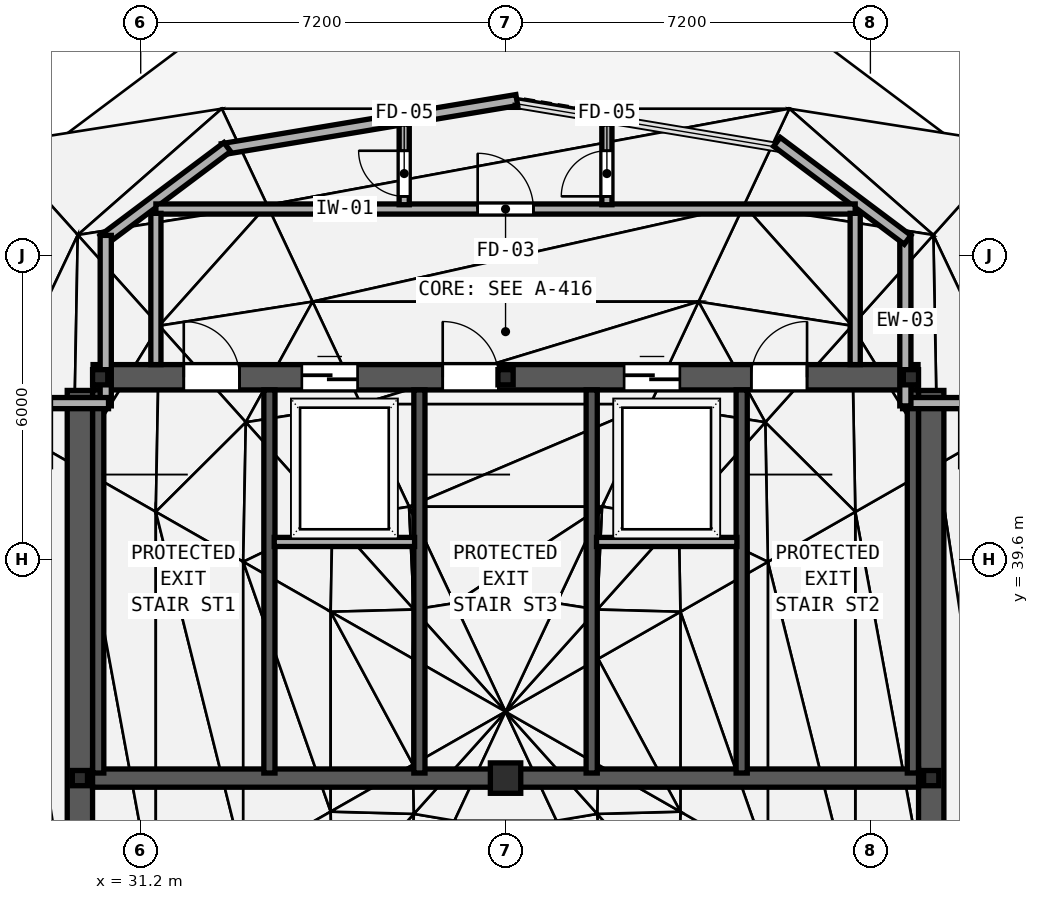
"""IFC4 building model, lengths in metres.
Left out: names, types, materials, properties, quantities, classifications, styles, units other than length and angle.
Written with IfcOpenShell. Run it as: python <this file> out.ifc"""

import sys

from ifc_helpers import new_model, si_unit, direction, frame, frame_2d, origin, origin_2d, place, context, subcontext, project, spatial, rectangle, hollow_rectangle, i_section, extrude, element, fill, save


model = new_model("IFC4")
c1 = context("Model", 3, precision=1e-05, world=origin(), true_north=direction((0.0, 1.0)))
c2 = subcontext(c1, "Body", "Model", "MODEL_VIEW")
j1 = project(units=[si_unit("LENGTHUNIT", "METRE"), si_unit("PLANEANGLEUNIT", "RADIAN")], contexts=[c1])
p1 = place(None, origin())
s1 = spatial("IfcSite", under=j1, at=p1, CompositionType="ELEMENT")
p2 = place(p1, origin())
s2 = spatial("IfcBuilding", under=s1, at=p2, CompositionType="ELEMENT")
p3 = place(p2, frame((0.0, 0.0, 333.0)))
s3 = spatial("IfcBuildingStorey", under=s2, at=p3, CompositionType="ELEMENT", Elevation=333.0)
p4 = place(p3, frame((30.26, 43.2, 0.0), z_axis=(0.0, 0.0, 1.0), x_axis=(1.0, 0.0, 0.0)))
e1 = element("IfcWall", 1, at=p4, inside=s3, PredefinedType="SHEAR", context=c2, shape_type="SweptSolid", body=[
    extrude(rectangle(XDim=16.28, YDim=0.5, at=frame_2d((8.14, 0.0))), origin(), (0.0, 0.0, 1.0), 4.8),
])
p5 = place(p4, frame((1.79, 0.0, 0.0)))
e2 = element("IfcOpeningElement", 2, at=p5, cuts=e1, PredefinedType="OPENING", context=c2, shape_type="SweptSolid", body=[
    extrude(rectangle(XDim=1.1, YDim=2.15, at=frame_2d((0.55, 1.075))), frame((0.0, 0.26, 0.0), z_axis=(0.0, -1.0, 0.0), x_axis=(1.0, 0.0, 0.0)), (0.0, 0.0, 1.0), 0.52),
])
p6 = place(p4, frame((6.9, 0.0, 0.0)))
e3 = element("IfcOpeningElement", 3, at=p6, cuts=e1, PredefinedType="OPENING", context=c2, shape_type="SweptSolid", body=[
    extrude(rectangle(XDim=1.1, YDim=2.15, at=frame_2d((0.55, 1.075))), frame((0.0, 0.26, 0.0), z_axis=(0.0, -1.0, 0.0), x_axis=(1.0, 0.0, 0.0)), (0.0, 0.0, 1.0), 0.52),
])
p7 = place(p4, frame((12.99, 0.0, 0.0)))
e4 = element("IfcOpeningElement", 4, at=p7, cuts=e1, PredefinedType="OPENING", context=c2, shape_type="SweptSolid", body=[
    extrude(rectangle(XDim=1.1, YDim=2.15, at=frame_2d((0.55, 1.075))), frame((0.0, 0.26, 0.0), z_axis=(0.0, -1.0, 0.0), x_axis=(1.0, 0.0, 0.0)), (0.0, 0.0, 1.0), 0.52),
])
p8 = place(p4, frame((4.12, 0.0, 0.0)))
e5 = element("IfcOpeningElement", 5, at=p8, cuts=e1, PredefinedType="OPENING", context=c2, shape_type="SweptSolid", body=[
    extrude(rectangle(XDim=1.1, YDim=2.2, at=frame_2d((0.55, 1.1))), frame((0.0, 0.26, 0.0), z_axis=(0.0, -1.0, 0.0), x_axis=(1.0, 0.0, 0.0)), (0.0, 0.0, 1.0), 0.52),
])
p9 = place(p4, frame((10.48, 0.0, 0.0)))
e6 = element("IfcOpeningElement", 6, at=p9, cuts=e1, PredefinedType="OPENING", context=c2, shape_type="SweptSolid", body=[
    extrude(rectangle(XDim=1.1, YDim=2.2, at=frame_2d((0.55, 1.1))), frame((0.0, 0.26, 0.0), z_axis=(0.0, -1.0, 0.0), x_axis=(1.0, 0.0, 0.0)), (0.0, 0.0, 1.0), 0.52),
])
for number, where, z_axis, x_axis in (
    (7, (30.0, 26.66, 0.0), (0.0, 0.0, 1.0), (0.0, 1.0, 0.0)),
    (8, (46.8, 26.66, 0.0), (0.0, 0.0, 1.0), (0.0, 1.0, 0.0)),
):
    element("IfcWall", number, at=place(p3, frame(where, z_axis=z_axis, x_axis=x_axis)), inside=s3, PredefinedType="SHEAR", context=c2, shape_type="SweptSolid", body=[
        extrude(rectangle(XDim=16.28, YDim=0.5, at=frame_2d((8.14, 0.0))), origin(), (0.0, 0.0, 1.0), 4.8),
    ])
p10 = place(p3, frame((30.25, 35.29, 0.0), z_axis=(0.0, 0.0, 1.0), x_axis=(1.0, 0.0, 0.0)))
e9 = element("IfcWall", 9, at=p10, inside=s3, PredefinedType="SHEAR", context=c2, shape_type="SweptSolid", body=[
    extrude(rectangle(XDim=16.3, YDim=0.36, at=frame_2d((8.15, 0.0))), origin(), (0.0, 0.0, 1.0), 4.8),
])
for number, where, z_axis, x_axis in (
    (10, (30.362, 35.39, 0.0), (0.0, 0.0, 1.0), (0.0, 1.0, 0.0)),
    (11, (33.74, 35.39, 0.0), (0.0, 0.0, 1.0), (0.0, 1.0, 0.0)),
    (12, (36.7, 35.39, 0.0), (0.0, 0.0, 1.0), (0.0, 1.0, 0.0)),
    (13, (40.1, 35.39, 0.0), (0.0, 0.0, 1.0), (0.0, 1.0, 0.0)),
    (14, (43.06, 35.39, 0.0), (0.0, 0.0, 1.0), (0.0, 1.0, 0.0)),
    (15, (46.438, 35.39, 0.0), (0.0, 0.0, 1.0), (0.0, 1.0, 0.0)),
):
    element("IfcWall", number, at=place(p3, frame(where, z_axis=z_axis, x_axis=x_axis)), inside=s3, PredefinedType="SHEAR", context=c2, shape_type="SweptSolid", body=[
        extrude(rectangle(XDim=7.56, YDim=0.22, at=frame_2d((3.78, 0.0))), origin(), (0.0, 0.0, 1.0), 4.8),
    ])
for number, where, z_axis, x_axis in (
    (16, (46.4, 43.2, 4.35), (0.0, 0.0, 1.0), (1.0, 0.0, 0.0)),
    (17, (30.4, 43.2, 4.35), (0.0, 0.0, 1.0), (1.0, 0.0, 0.0)),
):
    element("IfcColumn", number, at=place(p3, frame(where, z_axis=z_axis, x_axis=x_axis)), inside=s3, PredefinedType="COLUMN", context=c2, shape_type="SweptSolid", body=[
        extrude(i_section(OverallWidth=0.3, OverallDepth=0.3, WebThickness=0.01, FlangeThickness=0.015, FilletRadius=0.018, at=origin_2d()), origin(), (0.0, 0.0, 1.0), 3.354),
    ])
p11 = place(p3, frame((38.4, 35.29, 4.8), z_axis=(0.0, 0.0, 1.0), x_axis=(1.0, 0.0, 0.0)))
e18 = element("IfcColumn", 18, at=p11, inside=s3, PredefinedType="COLUMN", context=c2, shape_type="SweptSolid", body=[
    extrude(hollow_rectangle(XDim=0.6, YDim=0.6, WallThickness=0.024, at=origin_2d()), origin(), (0.0, 0.0, 1.0), 20.15),
])
for number, where, z_axis, x_axis in (
    (19, (46.8, 35.29, 4.35), (0.0, 0.0, 1.0), (1.0, 0.0, 0.0)),
    (20, (38.4, 43.2, 4.35), (0.0, 0.0, 1.0), (1.0, 0.0, 0.0)),
    (21, (30.0, 35.29, 4.35), (0.0, 0.0, 1.0), (1.0, 0.0, 0.0)),
):
    element("IfcColumn", number, at=place(p3, frame(where, z_axis=z_axis, x_axis=x_axis)), inside=s3, PredefinedType="COLUMN", context=c2, shape_type="SweptSolid", body=[
        extrude(i_section(OverallWidth=0.3, OverallDepth=0.3, WebThickness=0.01, FlangeThickness=0.015, FilletRadius=0.018, at=origin_2d()), origin(), (0.0, 0.0, 1.0), 3.354),
    ])
p12 = place(p3, frame((47.545, 42.69, 0.0), z_axis=(0.0, 0.0, 1.0), x_axis=(-1.0, 0.0, 0.0)))
e22 = element("IfcWall", 22, at=p12, inside=s3, PredefinedType="SOLIDWALL", context=c2, shape_type="SweptSolid", body=[
    extrude(rectangle(XDim=1.31, YDim=0.22, at=frame_2d((0.655, 0.0))), origin(), (0.0, 0.0, 1.0), 4.38),
])
p13 = place(p3, frame((46.29, 42.635, 0.0), z_axis=(0.0, 0.0, 1.0), x_axis=(0.0, 1.0, 0.0)))
e23 = element("IfcWall", 23, at=p13, inside=s3, PredefinedType="SOLIDWALL", context=c2, shape_type="SweptSolid", body=[
    extrude(rectangle(XDim=3.365, YDim=0.22, at=frame_2d((1.683, 0.0))), origin(), (0.0, 0.0, 1.0), 4.38),
])
p14 = place(p3, frame((46.334, 45.912, 0.0), z_axis=(0.0, 0.0, 1.0), x_axis=(-0.8, 0.6, 0.0)))
e24 = element("IfcWall", 24, at=p14, inside=s3, PredefinedType="SOLIDWALL", context=c2, shape_type="SweptSolid", body=[
    extrude(rectangle(XDim=3.223, YDim=0.22, at=frame_2d((1.611, 0.0))), origin(), (0.0, 0.0, 1.0), 4.38),
])
p15 = place(p3, frame((38.622, 48.67, 0.0), z_axis=(0.0, 0.0, 1.0), x_axis=(-0.986391684033, -0.164412425533, 0.0)))
e25 = element("IfcWall", 25, at=p15, inside=s3, PredefinedType="SOLIDWALL", context=c2, shape_type="SweptSolid", body=[
    extrude(rectangle(XDim=5.892, YDim=0.22, at=frame_2d((2.946, 0.0))), origin(), (0.0, 0.0, 1.0), 4.38),
])
p16 = place(p3, frame((32.908, 47.744, 0.0), z_axis=(0.0, 0.0, 1.0), x_axis=(-0.800009597134, -0.599987203609, 0.0)))
e26 = element("IfcWall", 26, at=p16, inside=s3, PredefinedType="SOLIDWALL", context=c2, shape_type="SweptSolid", body=[
    extrude(rectangle(XDim=3.053, YDim=0.22, at=frame_2d((1.526, 0.0))), origin(), (0.0, 0.0, 1.0), 4.38),
])
p17 = place(p3, frame((30.51, 46.0, 0.0), z_axis=(0.0, 0.0, 1.0), x_axis=(0.0, -1.0, 0.0)))
e27 = element("IfcWall", 27, at=p17, inside=s3, PredefinedType="SOLIDWALL", context=c2, shape_type="SweptSolid", body=[
    extrude(rectangle(XDim=3.365, YDim=0.22, at=frame_2d((1.683, 0.0))), origin(), (0.0, 0.0, 1.0), 4.38),
])
p18 = place(p3, frame((30.565, 42.69, 0.0), z_axis=(0.0, 0.0, 1.0), x_axis=(-1.0, 0.0, 0.0)))
e28 = element("IfcWall", 28, at=p18, inside=s3, PredefinedType="SOLIDWALL", context=c2, shape_type="SweptSolid", body=[
    extrude(rectangle(XDim=1.31, YDim=0.22, at=frame_2d((0.655, 0.0))), origin(), (0.0, 0.0, 1.0), 4.38),
])
p19 = place(p3, frame((31.5, 46.52, 0.0), z_axis=(0.0, 0.0, 1.0), x_axis=(1.0, 0.0, 0.0)))
e29 = element("IfcWall", 29, at=p19, inside=s3, PredefinedType="SOLIDWALL", context=c2, shape_type="SweptSolid", body=[
    extrude(rectangle(XDim=13.8, YDim=0.2, at=frame_2d((6.9, 0.0))), origin(), (0.0, 0.0, 1.0), 4.38),
])
p20 = place(p19, frame((6.35, 0.0, 0.0)))
e30 = element("IfcOpeningElement", 30, at=p20, cuts=e29, PredefinedType="OPENING", context=c2, shape_type="SweptSolid", body=[
    extrude(rectangle(XDim=1.1, YDim=2.15, at=frame_2d((0.55, 1.075))), frame((0.0, 0.11, 0.0), z_axis=(0.0, -1.0, 0.0), x_axis=(1.0, 0.0, 0.0)), (0.0, 0.0, 1.0), 0.22),
])
for number, where, z_axis, x_axis in (
    (31, (31.5, 43.45, 0.0), (0.0, 0.0, 1.0), (0.0, 1.0, 0.0)),
    (32, (45.3, 43.45, 0.0), (0.0, 0.0, 1.0), (0.0, 1.0, 0.0)),
):
    element("IfcWall", number, at=place(p3, frame(where, z_axis=z_axis, x_axis=x_axis)), inside=s3, PredefinedType="SOLIDWALL", context=c2, shape_type="SweptSolid", body=[
        extrude(rectangle(XDim=2.985, YDim=0.2, at=frame_2d((1.493, 0.0))), origin(), (0.0, 0.0, 1.0), 4.38),
    ])
for number, where, z_axis, x_axis in (
    (33, (33.835, 39.95, 0.0), (0.0, 0.0, 1.0), (1.0, 0.0, 0.0)),
    (34, (40.195, 39.95, 0.0), (0.0, 0.0, 1.0), (1.0, 0.0, 0.0)),
):
    element("IfcWall", number, at=place(p3, frame(where, z_axis=z_axis, x_axis=x_axis)), inside=s3, PredefinedType="SOLIDWALL", context=c2, shape_type="SweptSolid", body=[
        extrude(rectangle(XDim=2.77, YDim=0.18, at=frame_2d((1.385, 0.0))), origin(), (0.0, 0.0, 1.0), 4.38),
    ])
p21 = place(p3, frame((36.4, 46.605, 0.0), z_axis=(0.0, 0.0, 1.0), x_axis=(0.0, 1.0, 0.0)))
e35 = element("IfcWall", 35, at=p21, inside=s3, PredefinedType="SOLIDWALL", context=c2, shape_type="SweptSolid", body=[
    extrude(rectangle(XDim=1.592, YDim=0.2, at=frame_2d((0.796, 0.0))), origin(), (0.0, 0.0, 1.0), 4.38),
])
p22 = place(p21, frame((1.065, 0.0, 0.0), z_axis=(0.0, 0.0, 1.0), x_axis=(-1.0, 0.0, 0.0)))
e36 = element("IfcOpeningElement", 36, at=p22, cuts=e35, PredefinedType="OPENING", context=c2, shape_type="SweptSolid", body=[
    extrude(rectangle(XDim=0.9, YDim=2.1, at=frame_2d((0.45, 1.05))), frame((0.0, 0.11, 0.0), z_axis=(0.0, -1.0, 0.0), x_axis=(1.0, 0.0, 0.0)), (0.0, 0.0, 1.0), 0.22),
])
p23 = place(p3, frame((40.4, 46.605, 0.0), z_axis=(0.0, 0.0, 1.0), x_axis=(0.0, 1.0, 0.0)))
e37 = element("IfcWall", 37, at=p23, inside=s3, PredefinedType="SOLIDWALL", context=c2, shape_type="SweptSolid", body=[
    extrude(rectangle(XDim=1.592, YDim=0.2, at=frame_2d((0.796, 0.0))), origin(), (0.0, 0.0, 1.0), 4.38),
])
p24 = place(p23, frame((0.165, 0.0, 0.0)))
e38 = element("IfcOpeningElement", 38, at=p24, cuts=e37, PredefinedType="OPENING", context=c2, shape_type="SweptSolid", body=[
    extrude(rectangle(XDim=0.9, YDim=2.1, at=frame_2d((0.45, 1.05))), frame((0.0, 0.11, 0.0), z_axis=(0.0, -1.0, 0.0), x_axis=(1.0, 0.0, 0.0)), (0.0, 0.0, 1.0), 0.22),
])
p25 = place(p3, frame((0.0, 0.0, 4.38)))
p26 = place(p25, frame((32.0, 45.2, 0.0)))
p27 = place(p26, frame((0.0, 0.0, 0.37)))
e39 = element("IfcDoor", 39, at=p27, inside=s3, OperationType="SINGLE_SWING_LEFT", PredefinedType="TRAPDOOR", context=c2, shape_type="SweptSolid", body=[
    extrude(rectangle(XDim=1.0, YDim=1.0, at=origin_2d()), origin(), (0.0, 0.0, 1.0), 0.05),
])
p28 = place(p25, frame((44.8, 45.2, 0.0)))
p29 = place(p28, frame((0.0, 0.0, 0.37)))
e40 = element("IfcDoor", 40, at=p29, inside=s3, OperationType="SINGLE_SWING_LEFT", PredefinedType="TRAPDOOR", context=c2, shape_type="SweptSolid", body=[
    extrude(rectangle(XDim=1.0, YDim=1.0, at=origin_2d()), origin(), (0.0, 0.0, 1.0), 0.05),
])
p30 = place(p25, frame((38.4, 45.2, 0.0)))
p31 = place(p30, frame((0.0, 0.0, 0.37)))
e41 = element("IfcDoor", 41, at=p31, inside=s3, OperationType="SINGLE_SWING_LEFT", PredefinedType="TRAPDOOR", context=c2, shape_type="SweptSolid", body=[
    extrude(rectangle(XDim=1.0, YDim=1.0, at=origin_2d()), origin(), (0.0, 0.0, 1.0), 0.05),
])
p32 = place(p5, origin())
e42 = element("IfcDoor", 42, at=p32, inside=s3, OperationType="SINGLE_SWING_LEFT", PredefinedType="DOOR", context=c2, shape_type="SweptSolid", body=[
    extrude(rectangle(XDim=1.1, YDim=2.15, at=frame_2d((0.55, 1.075))), frame((0.0, 0.185, 0.0), z_axis=(0.0, -1.0, 0.0), x_axis=(1.0, 0.0, 0.0)), (0.0, 0.0, 1.0), 0.05),
])
fill(e2, e42)
p33 = place(p6, origin())
e43 = element("IfcDoor", 43, at=p33, inside=s3, OperationType="SINGLE_SWING_LEFT", PredefinedType="DOOR", context=c2, shape_type="SweptSolid", body=[
    extrude(rectangle(XDim=1.1, YDim=2.15, at=frame_2d((0.55, 1.075))), frame((0.0, 0.185, 0.0), z_axis=(0.0, -1.0, 0.0), x_axis=(1.0, 0.0, 0.0)), (0.0, 0.0, 1.0), 0.05),
])
fill(e3, e43)
p34 = place(p7, origin())
e44 = element("IfcDoor", 44, at=p34, inside=s3, OperationType="SINGLE_SWING_RIGHT", PredefinedType="DOOR", context=c2, shape_type="SweptSolid", body=[
    extrude(rectangle(XDim=1.1, YDim=2.15, at=frame_2d((0.55, 1.075))), frame((0.0, 0.185, 0.0), z_axis=(0.0, -1.0, 0.0), x_axis=(1.0, 0.0, 0.0)), (0.0, 0.0, 1.0), 0.05),
])
fill(e4, e44)
p35 = place(p20, origin())
e45 = element("IfcDoor", 45, at=p35, inside=s3, OperationType="SINGLE_SWING_LEFT", PredefinedType="DOOR", context=c2, shape_type="SweptSolid", body=[
    extrude(rectangle(XDim=1.1, YDim=2.15, at=frame_2d((0.55, 1.075))), frame((0.0, 0.025, 0.0), z_axis=(0.0, -1.0, 0.0), x_axis=(1.0, 0.0, 0.0)), (0.0, 0.0, 1.0), 0.05),
])
fill(e30, e45)
p36 = place(p8, origin())
e46 = element("IfcDoor", 46, at=p36, inside=s3, OperationType="SLIDING_TO_LEFT", PredefinedType="DOOR", context=c2, shape_type="SweptSolid", body=[
    extrude(rectangle(XDim=1.1, YDim=2.2, at=frame_2d((0.55, 1.1))), frame((0.0, 0.185, 0.0), z_axis=(0.0, -1.0, 0.0), x_axis=(1.0, 0.0, 0.0)), (0.0, 0.0, 1.0), 0.05),
])
fill(e5, e46)
p37 = place(p9, origin())
e47 = element("IfcDoor", 47, at=p37, inside=s3, OperationType="SLIDING_TO_LEFT", PredefinedType="DOOR", context=c2, shape_type="SweptSolid", body=[
    extrude(rectangle(XDim=1.1, YDim=2.2, at=frame_2d((0.55, 1.1))), frame((0.0, 0.185, 0.0), z_axis=(0.0, -1.0, 0.0), x_axis=(1.0, 0.0, 0.0)), (0.0, 0.0, 1.0), 0.05),
])
fill(e6, e47)
p38 = place(p22, origin())
e48 = element("IfcDoor", 48, at=p38, inside=s3, OperationType="SINGLE_SWING_LEFT", PredefinedType="DOOR", context=c2, shape_type="SweptSolid", body=[
    extrude(rectangle(XDim=0.9, YDim=2.1, at=frame_2d((0.45, 1.05))), frame((0.0, 0.025, 0.0), z_axis=(0.0, -1.0, 0.0), x_axis=(1.0, 0.0, 0.0)), (0.0, 0.0, 1.0), 0.05),
])
fill(e36, e48)
p39 = place(p24, origin())
e49 = element("IfcDoor", 49, at=p39, inside=s3, OperationType="SINGLE_SWING_LEFT", PredefinedType="DOOR", context=c2, shape_type="SweptSolid", body=[
    extrude(rectangle(XDim=0.9, YDim=2.1, at=frame_2d((0.45, 1.05))), frame((0.0, 0.025, 0.0), z_axis=(0.0, -1.0, 0.0), x_axis=(1.0, 0.0, 0.0)), (0.0, 0.0, 1.0), 0.05),
])
fill(e38, e49)
save(model, sys.argv[1])
